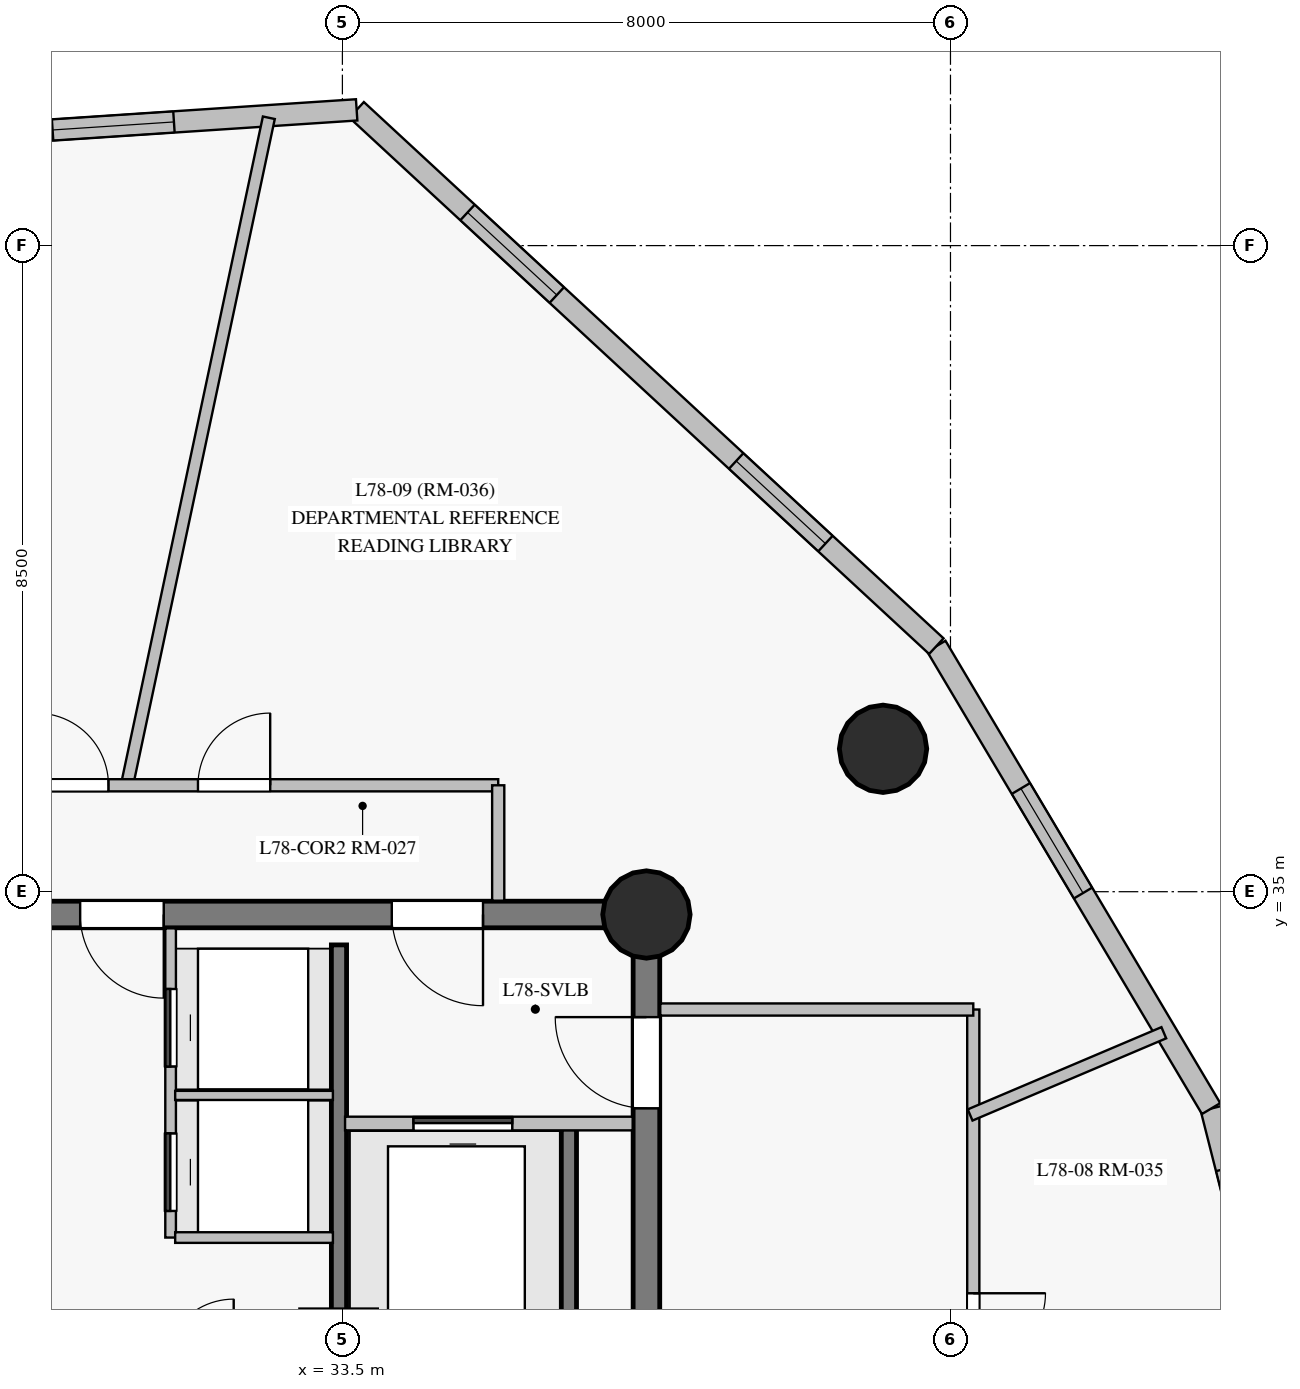
"""IFC4 building model, lengths in metres.
Left out: names, types, materials, properties, quantities, classifications, styles, units other than length and angle.
Written with IfcOpenShell. Run it as: python <this file> out.ifc"""

import sys

from ifc_helpers import new_model, si_unit, direction, frame, frame_2d, origin, origin_with_axes, origin_2d, place, context, subcontext, project, spatial, rectangle, circle, extrude, source, transform, mapped, element, fill, save


model = new_model("IFC4")
c1 = context("Model", 3, precision=1e-05, world=origin(), true_north=direction((0.0, 1.0)))
c2 = subcontext(c1, "Body", "Model", "MODEL_VIEW")
j1 = project(units=[si_unit("LENGTHUNIT", "METRE"), si_unit("PLANEANGLEUNIT", "RADIAN")], contexts=[c1])
p1 = place(None, origin())
s1 = spatial("IfcSite", under=j1, at=p1, CompositionType="ELEMENT")
p2 = place(p1, origin())
s2 = spatial("IfcBuilding", under=s1, at=p2, CompositionType="ELEMENT")
p3 = place(p2, frame((0.0, 0.0, 262.65)))
s3 = spatial("IfcBuildingStorey", under=s2, at=p3, CompositionType="ELEMENT", Elevation=262.65)
p4 = place(p3, frame((37.5, 18.3, 0.0), z_axis=(0.0, 0.0, 1.0), x_axis=(0.0, 1.0, 0.0)))
e1 = element("IfcWall", 1, at=p4, inside=s3, PredefinedType="SHEAR", context=c2, shape_type="SweptSolid", body=[
    extrude(rectangle(XDim=16.4, YDim=0.35, at=frame_2d((8.2, 0.0))), origin(), (0.0, 0.0, 1.0), 2.85),
])
p5 = place(p4, frame((13.85, 0.0, 0.0)))
e2 = element("IfcOpeningElement", 2, at=p5, cuts=e1, PredefinedType="OPENING", context=c2, shape_type="SweptSolid", body=[
    extrude(rectangle(XDim=1.2, YDim=2.15, at=frame_2d((0.6, 1.075))), frame((0.0, 0.185, 0.0), z_axis=(0.0, -1.0, 0.0), x_axis=(1.0, 0.0, 0.0)), (0.0, 0.0, 1.0), 0.37),
])
p6 = place(p3, frame((37.5, 34.7, 0.0), z_axis=(0.0, 0.0, 1.0), x_axis=(-1.0, 0.0, 0.0)))
e3 = element("IfcWall", 3, at=p6, inside=s3, PredefinedType="SHEAR", context=c2, shape_type="SweptSolid", body=[
    extrude(rectangle(XDim=10.95, YDim=0.35, at=frame_2d((5.475, 0.0))), origin(), (0.0, 0.0, 1.0), 2.85),
])
p7 = place(p6, frame((2.15, 0.0, 0.0)))
e4 = element("IfcOpeningElement", 4, at=p7, cuts=e3, PredefinedType="OPENING", context=c2, shape_type="SweptSolid", body=[
    extrude(rectangle(XDim=1.2, YDim=2.15, at=frame_2d((0.6, 1.075))), frame((0.0, 0.185, 0.0), z_axis=(0.0, -1.0, 0.0), x_axis=(1.0, 0.0, 0.0)), (0.0, 0.0, 1.0), 0.37),
])
p8 = place(p6, frame((6.35, 0.0, 0.0)))
e5 = element("IfcOpeningElement", 5, at=p8, cuts=e3, PredefinedType="OPENING", context=c2, shape_type="SweptSolid", body=[
    extrude(rectangle(XDim=1.1, YDim=2.15, at=frame_2d((0.55, 1.075))), frame((0.0, 0.185, 0.0), z_axis=(0.0, -1.0, 0.0), x_axis=(1.0, 0.0, 0.0)), (0.0, 0.0, 1.0), 0.37),
])
m1 = source(origin_with_axes(), c2, "Body", "SweptSolid", [
    extrude(circle(Radius=0.575, at=origin_2d()), origin(), (0.0, 0.0, 1.0), 3.05),
])
for number, where, z_axis, x_axis in (
    (6, (37.5, 34.7, 0.0), (0.0, 0.0, 1.0), (1.0, 0.0, 0.0)),
    (7, (40.613, 36.88, 0.0), (0.0, 0.0, 1.0), (1.0, 0.0, 0.0)),
):
    element("IfcColumn", number, at=place(p3, frame(where, z_axis=z_axis, x_axis=x_axis)), inside=s3, PredefinedType="COLUMN", context=c2, shape_type="MappedRepresentation", body=[
        mapped(m1, transform((0.0, 0.0, 0.0), scale=1.0)),
    ])
p9 = place(p3, frame((47.48, 22.075, 0.0), z_axis=(0.0, 0.0, 1.0), x_axis=(-0.24553675392, 0.969387281985, 0.0)))
e8 = element("IfcWall", 8, at=p9, inside=s3, PredefinedType="SOLIDWALL", context=c2, shape_type="SweptSolid", body=[
    extrude(rectangle(XDim=10.39, YDim=0.28, at=frame_2d((5.195, 0.0))), origin(), (0.0, 0.0, 1.0), 2.85),
])
p10 = place(p9, frame((2.841, 0.0, 0.85)))
e9 = element("IfcOpeningElement", 9, at=p10, cuts=e8, PredefinedType="OPENING", context=c2, shape_type="SweptSolid", body=[
    extrude(rectangle(XDim=1.6, YDim=1.6, at=frame_2d((0.8, 0.8))), frame((0.0, 0.15, 0.0), z_axis=(0.0, -1.0, 0.0), x_axis=(1.0, 0.0, 0.0)), (0.0, 0.0, 1.0), 0.3),
])
p11 = place(p9, frame((7.976, 0.0, 0.85)))
e10 = element("IfcOpeningElement", 10, at=p11, cuts=e8, PredefinedType="OPENING", context=c2, shape_type="SweptSolid", body=[
    extrude(rectangle(XDim=1.6, YDim=1.6, at=frame_2d((0.8, 0.8))), frame((0.0, 0.15, 0.0), z_axis=(0.0, -1.0, 0.0), x_axis=(1.0, 0.0, 0.0)), (0.0, 0.0, 1.0), 0.3),
])
p12 = place(p3, frame((44.929, 32.147, 0.0), z_axis=(0.0, 0.0, 1.0), x_axis=(-0.510843219919, 0.859673894371, 0.0)))
e11 = element("IfcWall", 11, at=p12, inside=s3, PredefinedType="SOLIDWALL", context=c2, shape_type="SweptSolid", body=[
    extrude(rectangle(XDim=7.076, YDim=0.28, at=frame_2d((3.538, 0.0))), origin(), (0.0, 0.0, 1.0), 2.85),
])
p13 = place(p12, frame((3.299, 0.0, 0.85)))
e12 = element("IfcOpeningElement", 12, at=p13, cuts=e11, PredefinedType="OPENING", context=c2, shape_type="SweptSolid", body=[
    extrude(rectangle(XDim=1.6, YDim=1.6, at=frame_2d((0.8, 0.8))), frame((0.0, 0.15, 0.0), z_axis=(0.0, -1.0, 0.0), x_axis=(1.0, 0.0, 0.0)), (0.0, 0.0, 1.0), 0.3),
])
p14 = place(p3, frame((41.314, 38.23, 0.0), z_axis=(0.0, 0.0, 1.0), x_axis=(-0.734042626163, 0.67910339638, 0.0)))
e13 = element("IfcWall", 13, at=p14, inside=s3, PredefinedType="SOLIDWALL", context=c2, shape_type="SweptSolid", body=[
    extrude(rectangle(XDim=10.39, YDim=0.28, at=frame_2d((5.195, 0.0))), origin(), (0.0, 0.0, 1.0), 2.85),
])
p15 = place(p14, frame((1.987, 0.0, 0.85)))
e14 = element("IfcOpeningElement", 14, at=p15, cuts=e13, PredefinedType="OPENING", context=c2, shape_type="SweptSolid", body=[
    extrude(rectangle(XDim=1.6, YDim=1.6, at=frame_2d((0.8, 0.8))), frame((0.0, 0.15, 0.0), z_axis=(0.0, -1.0, 0.0), x_axis=(1.0, 0.0, 0.0)), (0.0, 0.0, 1.0), 0.3),
])
p16 = place(p14, frame((6.802, 0.0, 0.85)))
e15 = element("IfcOpeningElement", 15, at=p16, cuts=e13, PredefinedType="OPENING", context=c2, shape_type="SweptSolid", body=[
    extrude(rectangle(XDim=1.6, YDim=1.6, at=frame_2d((0.8, 0.8))), frame((0.0, 0.15, 0.0), z_axis=(0.0, -1.0, 0.0), x_axis=(1.0, 0.0, 0.0)), (0.0, 0.0, 1.0), 0.3),
])
p17 = place(p3, frame((33.688, 45.286, 0.0), z_axis=(0.0, 0.0, 1.0), x_axis=(-0.997818003346, -0.066024481805, 0.0)))
e16 = element("IfcWall", 16, at=p17, inside=s3, PredefinedType="SOLIDWALL", context=c2, shape_type="SweptSolid", body=[
    extrude(rectangle(XDim=8.749, YDim=0.28, at=frame_2d((4.375, 0.0))), origin(), (0.0, 0.0, 1.0), 2.85),
])
p18 = place(p17, frame((2.409, 0.0, 0.85)))
e17 = element("IfcOpeningElement", 17, at=p18, cuts=e16, PredefinedType="OPENING", context=c2, shape_type="SweptSolid", body=[
    extrude(rectangle(XDim=1.6, YDim=1.6, at=frame_2d((0.8, 0.8))), frame((0.0, 0.15, 0.0), z_axis=(0.0, -1.0, 0.0), x_axis=(1.0, 0.0, 0.0)), (0.0, 0.0, 1.0), 0.3),
])
p19 = place(p17, frame((5.849, 0.0, 0.85)))
e18 = element("IfcOpeningElement", 18, at=p19, cuts=e16, PredefinedType="OPENING", context=c2, shape_type="SweptSolid", body=[
    extrude(rectangle(XDim=1.6, YDim=1.6, at=frame_2d((0.8, 0.8))), frame((0.0, 0.15, 0.0), z_axis=(0.0, -1.0, 0.0), x_axis=(1.0, 0.0, 0.0)), (0.0, 0.0, 1.0), 0.3),
])
p20 = place(p3, frame((33.455, 18.7, 0.0), z_axis=(0.0, 0.0, 1.0), x_axis=(0.0, 1.0, 0.0)))
e19 = element("IfcWall", 19, at=p20, inside=s3, PredefinedType="SHEAR", context=c2, shape_type="SweptSolid", body=[
    extrude(rectangle(XDim=15.6, YDim=0.2, at=frame_2d((7.8, 0.0))), origin(), (0.0, 0.0, 1.0), 2.85),
])
p21 = place(p20, frame((2.75, 0.0, 0.0)))
e20 = element("IfcOpeningElement", 20, at=p21, cuts=e19, PredefinedType="OPENING", context=c2, shape_type="SweptSolid", body=[
    extrude(rectangle(XDim=1.15, YDim=2.15, at=frame_2d((0.575, 1.075))), frame((0.0, 0.11, 0.0), z_axis=(0.0, -1.0, 0.0), x_axis=(1.0, 0.0, 0.0)), (0.0, 0.0, 1.0), 0.22),
])
p22 = place(p20, frame((0.55, 0.0, 0.0)))
e21 = element("IfcOpeningElement", 21, at=p22, cuts=e19, PredefinedType="OPENING", context=c2, shape_type="SweptSolid", body=[
    extrude(rectangle(XDim=0.94, YDim=2.1, at=frame_2d((0.47, 1.05))), frame((0.0, 0.11, 0.0), z_axis=(0.0, -1.0, 0.0), x_axis=(1.0, 0.0, 0.0)), (0.0, 0.0, 1.0), 0.22),
])
p23 = place(p3, frame((36.48, 29.02, 0.0), z_axis=(0.0, 0.0, 1.0), x_axis=(0.0, 1.0, 0.0)))
e22 = element("IfcWall", 22, at=p23, inside=s3, PredefinedType="SHEAR", context=c2, shape_type="SweptSolid", body=[
    extrude(rectangle(XDim=2.86, YDim=0.2, at=frame_2d((1.43, 0.0))), origin(), (0.0, 0.0, 1.0), 2.85),
])
p24 = place(p3, frame((41.8, 33.45, 0.0), z_axis=(0.0, 0.0, 1.0), x_axis=(0.0, -1.0, 0.0)))
e23 = element("IfcWall", 23, at=p24, inside=s3, PredefinedType="PARTITIONING", context=c2, shape_type="SweptSolid", body=[
    extrude(rectangle(XDim=19.013, YDim=0.16, at=frame_2d((9.506, 0.0))), origin(), (0.0, 0.0, 1.0), 2.3),
])
p25 = place(p24, frame((11.869, 0.0, 0.0)))
e24 = element("IfcOpeningElement", 24, at=p25, cuts=e23, PredefinedType="OPENING", context=c2, shape_type="SweptSolid", body=[
    extrude(rectangle(XDim=0.95, YDim=2.15, at=frame_2d((0.475, 1.075))), frame((0.0, 0.09, 0.0), z_axis=(0.0, -1.0, 0.0), x_axis=(1.0, 0.0, 0.0)), (0.0, 0.0, 1.0), 0.18),
])
p26 = place(p24, frame((9.021, 0.0, 0.0)))
e25 = element("IfcOpeningElement", 25, at=p26, cuts=e23, PredefinedType="OPENING", context=c2, shape_type="SweptSolid", body=[
    extrude(rectangle(XDim=0.95, YDim=2.15, at=frame_2d((0.475, 1.075))), frame((0.0, 0.09, 0.0), z_axis=(0.0, -1.0, 0.0), x_axis=(1.0, 0.0, 0.0)), (0.0, 0.0, 1.0), 0.18),
])
p27 = place(p24, frame((3.733, 0.0, 0.0)))
e26 = element("IfcOpeningElement", 26, at=p27, cuts=e23, PredefinedType="OPENING", context=c2, shape_type="SweptSolid", body=[
    extrude(rectangle(XDim=0.95, YDim=2.15, at=frame_2d((0.475, 1.075))), frame((0.0, 0.09, 0.0), z_axis=(0.0, -1.0, 0.0), x_axis=(1.0, 0.0, 0.0)), (0.0, 0.0, 1.0), 0.18),
])
p28 = place(p3, frame((30.659, 36.371, 0.0), z_axis=(0.0, 0.0, 1.0), x_axis=(0.207901866493, 0.978149688907, 0.0)))
e27 = element("IfcWall", 27, at=p28, inside=s3, PredefinedType="PARTITIONING", context=c2, shape_type="SweptSolid", body=[
    extrude(rectangle(XDim=9.008, YDim=0.16, at=frame_2d((4.504, 0.0))), origin(), (0.0, 0.0, 1.0), 2.85),
])
p29 = place(p3, frame((28.6, 36.4, 0.0), z_axis=(0.0, 0.0, 1.0), x_axis=(1.0, 0.0, 0.0)))
e28 = element("IfcWall", 28, at=p29, inside=s3, PredefinedType="PARTITIONING", context=c2, shape_type="SweptSolid", body=[
    extrude(rectangle(XDim=6.95, YDim=0.16, at=frame_2d((3.475, 0.0))), origin(), (0.0, 0.0, 1.0), 2.45),
])
p30 = place(p29, frame((3.0, 0.0, 0.0)))
e29 = element("IfcOpeningElement", 29, at=p30, cuts=e28, PredefinedType="OPENING", context=c2, shape_type="SweptSolid", body=[
    extrude(rectangle(XDim=0.95, YDim=2.15, at=frame_2d((0.475, 1.075))), frame((0.0, 0.09, 0.0), z_axis=(0.0, -1.0, 0.0), x_axis=(1.0, 0.0, 0.0)), (0.0, 0.0, 1.0), 0.18),
])
p31 = place(p29, frame((0.873, 0.0, 0.0)))
e30 = element("IfcOpeningElement", 30, at=p31, cuts=e28, PredefinedType="OPENING", context=c2, shape_type="SweptSolid", body=[
    extrude(rectangle(XDim=0.95, YDim=2.15, at=frame_2d((0.475, 1.075))), frame((0.0, 0.09, 0.0), z_axis=(0.0, -1.0, 0.0), x_axis=(1.0, 0.0, 0.0)), (0.0, 0.0, 1.0), 0.18),
])
p32 = place(p3, frame((37.682, 33.45, 0.0), z_axis=(0.0, 0.0, 1.0), x_axis=(1.0, 0.0, 0.0)))
e31 = element("IfcWall", 31, at=p32, inside=s3, PredefinedType="PARTITIONING", context=c2, shape_type="SweptSolid", body=[
    extrude(rectangle(XDim=4.118, YDim=0.16, at=frame_2d((2.059, 0.0))), origin(), (0.0, 0.0, 1.0), 2.85),
])
p33 = place(p3, frame((31.24, 30.45, 0.0), z_axis=(0.0, 0.0, 1.0), x_axis=(0.0, 1.0, 0.0)))
e32 = element("IfcWall", 32, at=p33, inside=s3, PredefinedType="PARTITIONING", context=c2, shape_type="SweptSolid", body=[
    extrude(rectangle(XDim=4.068, YDim=0.14, at=frame_2d((2.034, 0.0))), origin(), (0.0, 0.0, 1.0), 2.85),
])
p34 = place(p33, frame((0.35, 0.0, 0.0)))
e33 = element("IfcOpeningElement", 33, at=p34, cuts=e32, PredefinedType="OPENING", context=c2, shape_type="SweptSolid", body=[
    extrude(rectangle(XDim=1.02, YDim=2.15, at=frame_2d((0.51, 1.075))), frame((0.0, 0.08, 0.0), z_axis=(0.0, -1.0, 0.0), x_axis=(1.0, 0.0, 0.0)), (0.0, 0.0, 1.0), 0.16),
])
p35 = place(p33, frame((2.25, 0.0, 0.0)))
e34 = element("IfcOpeningElement", 34, at=p35, cuts=e32, PredefinedType="OPENING", context=c2, shape_type="SweptSolid", body=[
    extrude(rectangle(XDim=1.02, YDim=2.15, at=frame_2d((0.51, 1.075))), frame((0.0, 0.08, 0.0), z_axis=(0.0, -1.0, 0.0), x_axis=(1.0, 0.0, 0.0)), (0.0, 0.0, 1.0), 0.16),
])
p36 = place(p3, frame((33.535, 31.95, 0.0), z_axis=(0.0, 0.0, 1.0), x_axis=(1.0, 0.0, 0.0)))
e35 = element("IfcWall", 35, at=p36, inside=s3, PredefinedType="PARTITIONING", context=c2, shape_type="SweptSolid", body=[
    extrude(rectangle(XDim=3.784, YDim=0.18, at=frame_2d((1.892, 0.0))), origin(), (0.0, 0.0, 1.0), 2.85),
])
p37 = place(p36, frame((0.9, 0.0, 0.0)))
e36 = element("IfcOpeningElement", 36, at=p37, cuts=e35, PredefinedType="OPENING", context=c2, shape_type="SweptSolid", body=[
    extrude(rectangle(XDim=1.3, YDim=2.2, at=frame_2d((0.65, 1.1))), frame((0.0, 0.1, 0.0), z_axis=(0.0, -1.0, 0.0), x_axis=(1.0, 0.0, 0.0)), (0.0, 0.0, 1.0), 0.2),
])
p38 = place(p3, frame((41.759, 32.063, 0.0), z_axis=(0.0, 0.0, 1.0), x_axis=(0.92051258251, 0.390712919471, 0.0)))
e37 = element("IfcWall", 37, at=p38, inside=s3, PredefinedType="PARTITIONING", context=c2, shape_type="SweptSolid", body=[
    extrude(rectangle(XDim=2.768, YDim=0.16, at=frame_2d((1.384, 0.0))), origin(), (0.0, 0.0, 1.0), 2.85),
])
p39 = place(p3, frame((31.3, 30.45, 0.0), z_axis=(0.0, 0.0, 1.0), x_axis=(1.0, 0.0, 0.0)))
e38 = element("IfcWall", 38, at=p39, inside=s3, PredefinedType="PARTITIONING", context=c2, shape_type="SweptSolid", body=[
    extrude(rectangle(XDim=2.075, YDim=0.14, at=frame_2d((1.038, 0.0))), origin(), (0.0, 0.0, 1.0), 2.85),
])
p40 = place(p3, frame((31.3, 32.32, 0.0), z_axis=(0.0, 0.0, 1.0), x_axis=(1.0, 0.0, 0.0)))
e39 = element("IfcWall", 39, at=p40, inside=s3, PredefinedType="PARTITIONING", context=c2, shape_type="SweptSolid", body=[
    extrude(rectangle(XDim=2.075, YDim=0.12, at=frame_2d((1.038, 0.0))), origin(), (0.0, 0.0, 1.0), 2.85),
])
p41 = place(p3, frame((35.55, 36.4, 0.0), z_axis=(0.0, 0.0, 1.0), x_axis=(0.0, -1.0, 0.0)))
e40 = element("IfcWall", 40, at=p41, inside=s3, PredefinedType="PARTITIONING", context=c2, shape_type="SweptSolid", body=[
    extrude(rectangle(XDim=1.518, YDim=0.16, at=frame_2d((0.759, 0.0))), origin(), (0.0, 0.0, 1.0), 2.85),
])
m2 = source(origin_with_axes(), c2, "Body", "SweptSolid", [
    extrude(rectangle(XDim=1.6, YDim=1.6, at=frame_2d((0.8, 0.8))), frame((0.0, 0.03, 0.0), z_axis=(0.0, -1.0, 0.0), x_axis=(1.0, 0.0, 0.0)), (0.0, 0.0, 1.0), 0.06),
])
p42 = place(p13, origin())
e41 = element("IfcWindow", 41, at=p42, inside=s3, PartitioningType="SINGLE_PANEL", PredefinedType="WINDOW", context=c2, shape_type="MappedRepresentation", body=[
    mapped(m2, transform((0.0, 0.0, 0.0), scale=1.0)),
])
fill(e12, e41)
p43 = place(p15, origin())
e42 = element("IfcWindow", 42, at=p43, inside=s3, PartitioningType="SINGLE_PANEL", PredefinedType="WINDOW", context=c2, shape_type="MappedRepresentation", body=[
    mapped(m2, transform((0.0, 0.0, 0.0), scale=1.0)),
])
fill(e14, e42)
p44 = place(p16, origin())
e43 = element("IfcWindow", 43, at=p44, inside=s3, PartitioningType="SINGLE_PANEL", PredefinedType="WINDOW", context=c2, shape_type="MappedRepresentation", body=[
    mapped(m2, transform((0.0, 0.0, 0.0), scale=1.0)),
])
fill(e15, e43)
p45 = place(p18, origin())
e44 = element("IfcWindow", 44, at=p45, inside=s3, PartitioningType="SINGLE_PANEL", PredefinedType="WINDOW", context=c2, shape_type="MappedRepresentation", body=[
    mapped(m2, transform((0.0, 0.0, 0.0), scale=1.0)),
])
fill(e17, e44)
m3 = source(origin_with_axes(), c2, "Body", "SweptSolid", [
    extrude(rectangle(XDim=1.2, YDim=2.15, at=frame_2d((0.6, 1.075))), frame((0.0, 0.025, 0.0), z_axis=(0.0, -1.0, 0.0), x_axis=(1.0, 0.0, 0.0)), (0.0, 0.0, 1.0), 0.05),
])
p46 = place(p5, origin())
e45 = element("IfcDoor", 45, at=p46, inside=s3, OperationType="SINGLE_SWING_RIGHT", PredefinedType="DOOR", context=c2, shape_type="MappedRepresentation", body=[
    mapped(m3, transform((0.0, 0.0, 0.0), scale=1.0)),
])
fill(e2, e45)
p47 = place(p7, origin())
e46 = element("IfcDoor", 46, at=p47, inside=s3, OperationType="SINGLE_SWING_LEFT", PredefinedType="DOOR", context=c2, shape_type="MappedRepresentation", body=[
    mapped(m3, transform((0.0, 0.0, 0.0), scale=1.0)),
])
fill(e4, e46)
m4 = source(origin_with_axes(), c2, "Body", "SweptSolid", [
    extrude(rectangle(XDim=1.3, YDim=2.2, at=frame_2d((0.65, 1.1))), frame((0.0, 0.025, 0.0), z_axis=(0.0, -1.0, 0.0), x_axis=(1.0, 0.0, 0.0)), (0.0, 0.0, 1.0), 0.05),
])
p48 = place(p37, origin())
e47 = element("IfcDoor", 47, at=p48, inside=s3, OperationType="SLIDING_TO_LEFT", PredefinedType="DOOR", context=c2, shape_type="MappedRepresentation", body=[
    mapped(m4, transform((0.0, 0.0, 0.0), scale=1.0)),
])
fill(e36, e47)
m5 = source(origin_with_axes(), c2, "Body", "SweptSolid", [
    extrude(rectangle(XDim=1.1, YDim=2.15, at=frame_2d((0.55, 1.075))), frame((0.0, 0.025, 0.0), z_axis=(0.0, -1.0, 0.0), x_axis=(1.0, 0.0, 0.0)), (0.0, 0.0, 1.0), 0.05),
])
p49 = place(p8, origin())
e48 = element("IfcDoor", 48, at=p49, inside=s3, OperationType="SINGLE_SWING_LEFT", PredefinedType="DOOR", context=c2, shape_type="MappedRepresentation", body=[
    mapped(m5, transform((0.0, 0.0, 0.0), scale=1.0)),
])
fill(e5, e48)
m6 = source(origin_with_axes(), c2, "Body", "SweptSolid", [
    extrude(rectangle(XDim=1.02, YDim=2.15, at=frame_2d((0.51, 1.075))), frame((0.0, 0.025, 0.0), z_axis=(0.0, -1.0, 0.0), x_axis=(1.0, 0.0, 0.0)), (0.0, 0.0, 1.0), 0.05),
])
p50 = place(p34, origin())
e49 = element("IfcDoor", 49, at=p50, inside=s3, OperationType="SLIDING_TO_LEFT", PredefinedType="DOOR", context=c2, shape_type="MappedRepresentation", body=[
    mapped(m6, transform((0.0, 0.0, 0.0), scale=1.0)),
])
fill(e33, e49)
p51 = place(p35, origin())
e50 = element("IfcDoor", 50, at=p51, inside=s3, OperationType="SLIDING_TO_LEFT", PredefinedType="DOOR", context=c2, shape_type="MappedRepresentation", body=[
    mapped(m6, transform((0.0, 0.0, 0.0), scale=1.0)),
])
fill(e34, e50)
m7 = source(origin_with_axes(), c2, "Body", "SweptSolid", [
    extrude(rectangle(XDim=0.95, YDim=2.15, at=frame_2d((0.475, 1.075))), frame((0.0, 0.025, 0.0), z_axis=(0.0, -1.0, 0.0), x_axis=(1.0, 0.0, 0.0)), (0.0, 0.0, 1.0), 0.05),
])
p52 = place(p27, origin())
e51 = element("IfcDoor", 51, at=p52, inside=s3, OperationType="SINGLE_SWING_LEFT", PredefinedType="DOOR", context=c2, shape_type="MappedRepresentation", body=[
    mapped(m7, transform((0.0, 0.0, 0.0), scale=1.0)),
])
fill(e26, e51)
p53 = place(p30, origin())
e52 = element("IfcDoor", 52, at=p53, inside=s3, OperationType="SINGLE_SWING_RIGHT", PredefinedType="DOOR", context=c2, shape_type="MappedRepresentation", body=[
    mapped(m7, transform((0.0, 0.0, 0.0), scale=1.0)),
])
fill(e29, e52)
p54 = place(p31, origin())
e53 = element("IfcDoor", 53, at=p54, inside=s3, OperationType="SINGLE_SWING_LEFT", PredefinedType="DOOR", context=c2, shape_type="MappedRepresentation", body=[
    mapped(m7, transform((0.0, 0.0, 0.0), scale=1.0)),
])
fill(e30, e53)
save(model, sys.argv[1])
